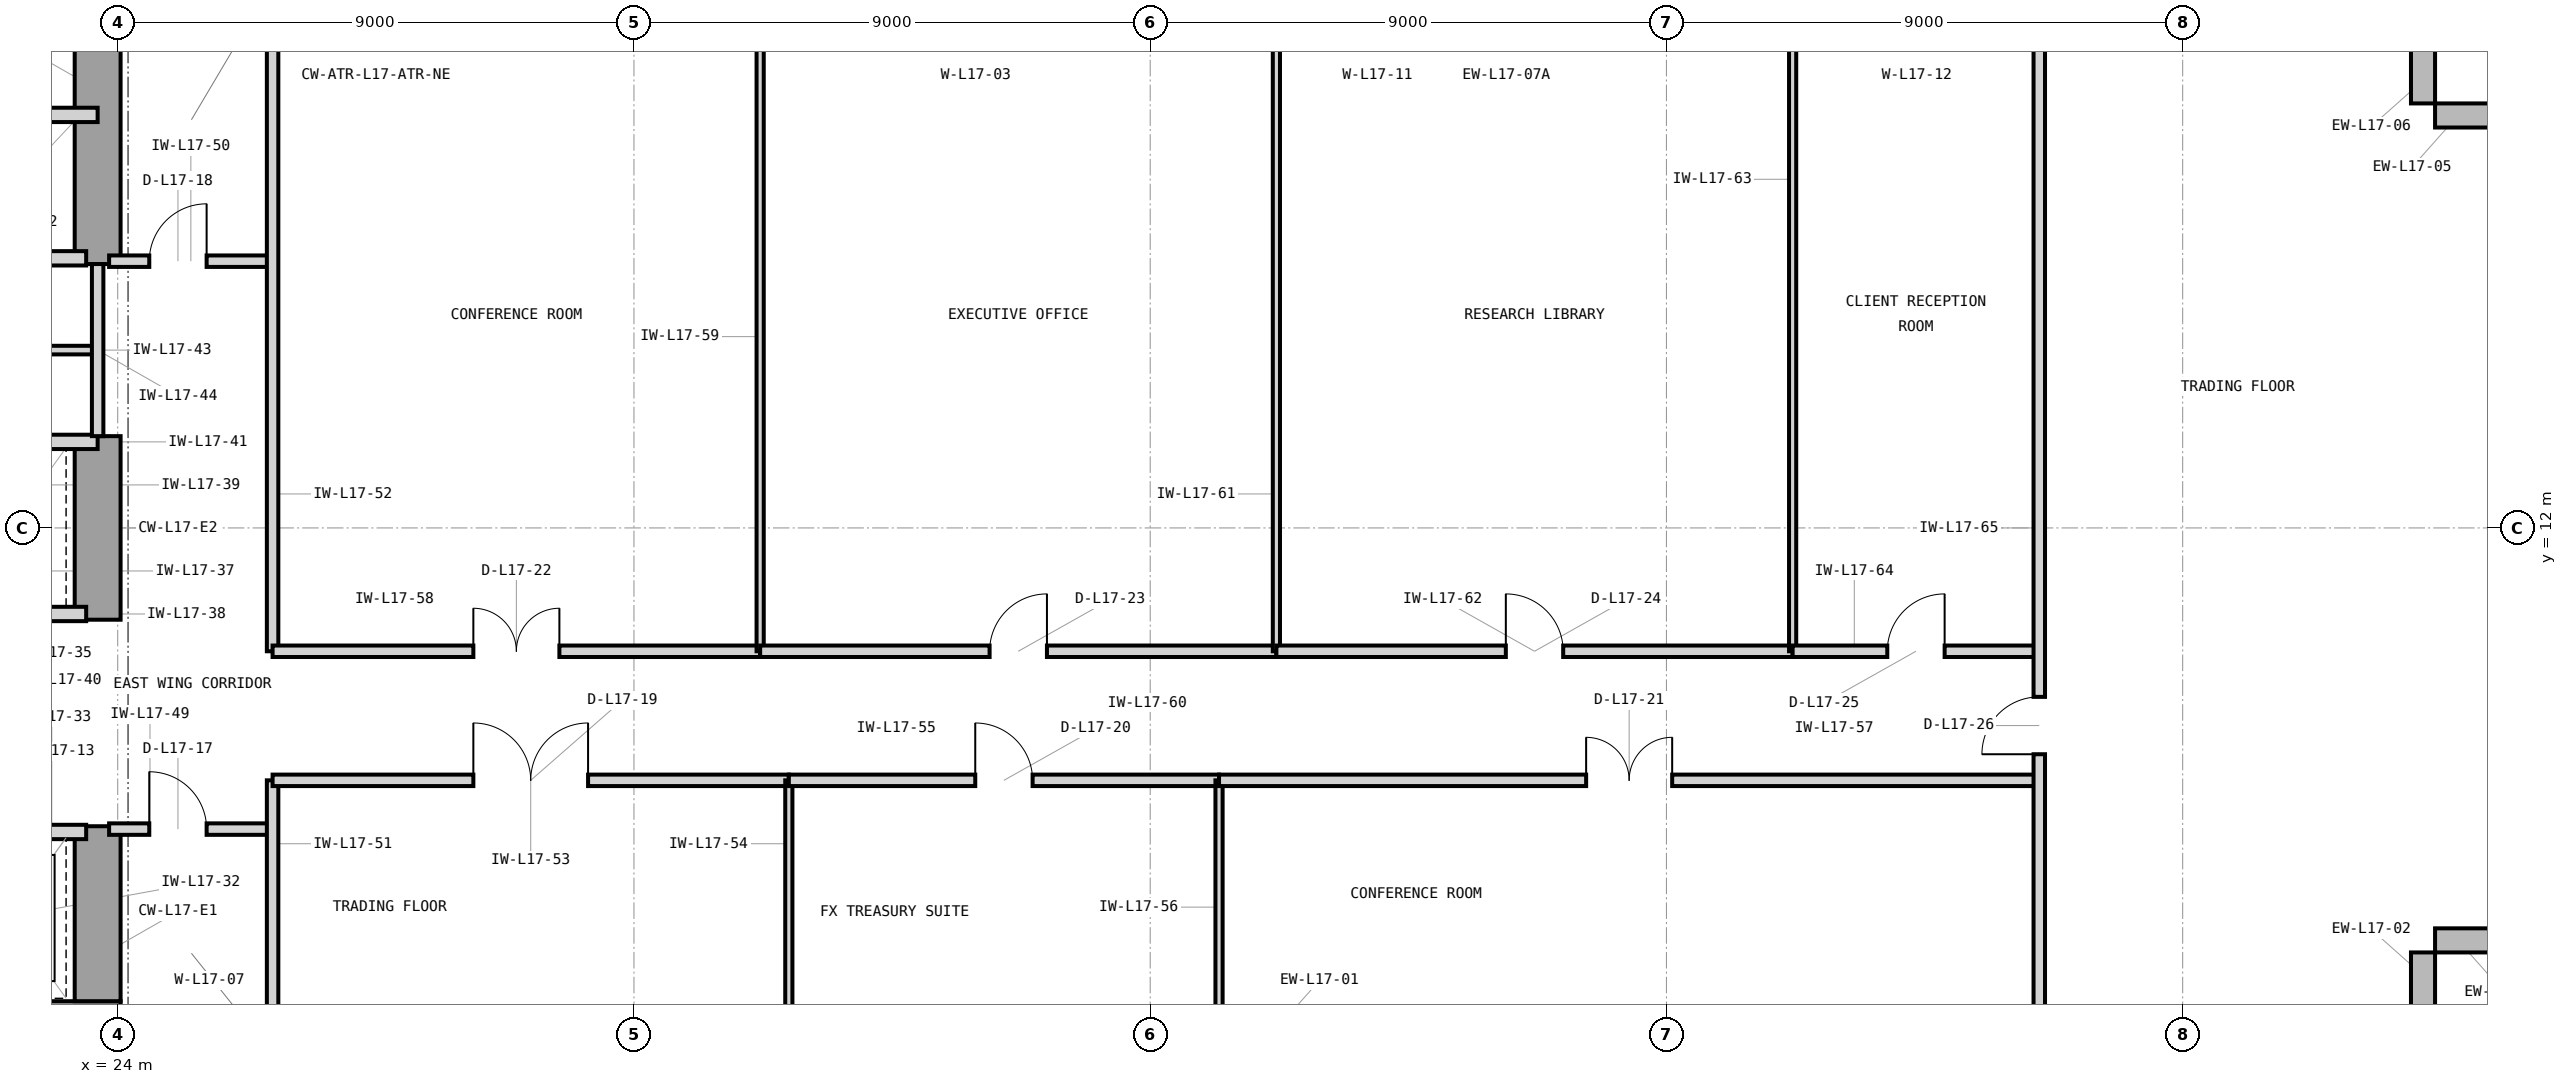
"""IFC4 building model, lengths in metres.
Left out: names, types, materials, properties, quantities, classifications, styles, units other than length and angle.
Written with IfcOpenShell. Run it as: python <this file> out.ifc"""

import sys

from ifc_helpers import new_model, si_unit, direction, frame, frame_2d, origin, place, context, subcontext, project, spatial, rectangle, extrude, element, fill, save


model = new_model("IFC4")
c1 = context("Model", 3, precision=1e-05, world=origin(), true_north=direction((0.0, 1.0)))
c2 = subcontext(c1, "Body", "Model", "MODEL_VIEW")
j1 = project(units=[si_unit("LENGTHUNIT", "METRE"), si_unit("PLANEANGLEUNIT", "RADIAN")], contexts=[c1])
p1 = place(None, origin())
s1 = spatial("IfcSite", under=j1, at=p1, CompositionType="ELEMENT")
p2 = place(p1, origin())
s2 = spatial("IfcBuilding", under=s1, at=p2, CompositionType="ELEMENT")
p3 = place(p2, frame((0.0, 0.0, 76.2)))
s3 = spatial("IfcBuildingStorey", under=s2, at=p3, CompositionType="ELEMENT", Elevation=76.2)
p4 = place(p3, frame((7.475, 3.35, 0.0), z_axis=(0.0, 0.0, 1.0), x_axis=(1.0, 0.0, 0.0)))
e1 = element("IfcWall", 1, at=p4, inside=s3, PredefinedType="SHEAR", context=c2, shape_type="SweptSolid", body=[
    extrude(rectangle(XDim=16.575, YDim=0.8, at=frame_2d((8.288, 0.0))), origin(), (0.0, 0.0, 1.0), 4.2),
])
p5 = place(p3, frame((23.65, 3.75, 0.0), z_axis=(0.0, 0.0, 1.0), x_axis=(0.0, 1.0, 0.0)))
e2 = element("IfcWall", 2, at=p5, inside=s3, PredefinedType="SHEAR", context=c2, shape_type="SweptSolid", body=[
    extrude(rectangle(XDim=3.05, YDim=0.8, at=frame_2d((1.525, 0.0))), origin(), (0.0, 0.0, 1.0), 4.2),
])
p6 = place(p3, frame((23.65, 10.4, 0.0), z_axis=(0.0, 0.0, 1.0), x_axis=(0.0, 1.0, 0.0)))
e3 = element("IfcWall", 3, at=p6, inside=s3, PredefinedType="SHEAR", context=c2, shape_type="SweptSolid", body=[
    extrude(rectangle(XDim=3.2, YDim=0.8, at=frame_2d((1.6, 0.0))), origin(), (0.0, 0.0, 1.0), 4.2),
])
p7 = place(p3, frame((23.65, 16.6, 0.0), z_axis=(0.0, 0.0, 1.0), x_axis=(0.0, 1.0, 0.0)))
e4 = element("IfcWall", 4, at=p7, inside=s3, PredefinedType="SHEAR", context=c2, shape_type="SweptSolid", body=[
    extrude(rectangle(XDim=4.05, YDim=0.8, at=frame_2d((2.025, 0.0))), origin(), (0.0, 0.0, 1.0), 4.2),
])
for number, where, z_axis, x_axis in (
    (5, (64.19, 3.0, 0.0), (0.0, 0.0, 1.0), (0.0, 1.0, 0.0)),
    (6, (64.4, 4.81, 0.0), (0.0, 0.0, 1.0), (1.0, 0.0, 0.0)),
    (7, (66.0, 19.19, 0.0), (0.0, 0.0, 1.0), (-1.0, 0.0, 0.0)),
    (8, (64.19, 19.4, 0.0), (0.0, 0.0, 1.0), (0.0, 1.0, 0.0)),
):
    element("IfcWall", number, at=place(p3, frame(where, z_axis=z_axis, x_axis=x_axis)), inside=s3, PredefinedType="STANDARD", context=c2, shape_type="SweptSolid", body=[
        extrude(rectangle(XDim=1.6, YDim=0.42, at=frame_2d((0.8, 0.0))), origin(), (0.0, 0.0, 1.0), 3.98),
    ])
p8 = place(p3, frame((21.05, 16.7, 0.0), z_axis=(0.0, 0.0, 1.0), x_axis=(1.0, 0.0, 0.0)))
e9 = element("IfcWall", 9, at=p8, inside=s3, PredefinedType="PARTITIONING", context=c2, shape_type="SweptSolid", body=[
    extrude(rectangle(XDim=2.4, YDim=0.25, at=frame_2d((1.2, 0.0))), origin(), (0.0, 0.0, 1.0), 3.426),
])
p9 = place(p3, frame((16.45, 19.2, 0.0), z_axis=(0.0, 0.0, 1.0), x_axis=(1.0, 0.0, 0.0)))
e10 = element("IfcWall", 10, at=p9, inside=s3, PredefinedType="PARTITIONING", context=c2, shape_type="SweptSolid", body=[
    extrude(rectangle(XDim=7.2, YDim=0.25, at=frame_2d((3.6, 0.0))), origin(), (0.0, 0.0, 1.0), 3.97),
])
p10 = place(p3, frame((21.05, 6.7, 0.0), z_axis=(0.0, 0.0, 1.0), x_axis=(1.0, 0.0, 0.0)))
e11 = element("IfcWall", 11, at=p10, inside=s3, PredefinedType="PARTITIONING", context=c2, shape_type="SweptSolid", body=[
    extrude(rectangle(XDim=2.4, YDim=0.25, at=frame_2d((1.2, 0.0))), origin(), (0.0, 0.0, 1.0), 3.426),
])
p11 = place(p10, frame((0.48, 0.0, 0.0)))
e12 = element("IfcOpeningElement", 12, at=p11, cuts=e11, PredefinedType="OPENING", context=c2, shape_type="SweptSolid", body=[
    extrude(rectangle(XDim=1.15, YDim=2.25, at=frame_2d((0.575, 1.125))), frame((0.0, 0.135, 0.0), z_axis=(0.0, -1.0, 0.0), x_axis=(1.0, 0.0, 0.0)), (0.0, 0.0, 1.0), 0.27),
])
p12 = place(p3, frame((21.05, 10.5, 0.0), z_axis=(0.0, 0.0, 1.0), x_axis=(1.0, 0.0, 0.0)))
e13 = element("IfcWall", 13, at=p12, inside=s3, PredefinedType="PARTITIONING", context=c2, shape_type="SweptSolid", body=[
    extrude(rectangle(XDim=2.4, YDim=0.25, at=frame_2d((1.2, 0.0))), origin(), (0.0, 0.0, 1.0), 3.426),
])
p13 = place(p3, frame((14.7, 13.5, 0.0), z_axis=(0.0, 0.0, 1.0), x_axis=(1.0, 0.0, 0.0)))
e14 = element("IfcWall", 14, at=p13, inside=s3, PredefinedType="PARTITIONING", context=c2, shape_type="SweptSolid", body=[
    extrude(rectangle(XDim=8.95, YDim=0.25, at=frame_2d((4.475, 0.0))), origin(), (0.0, 0.0, 1.0), 3.426),
])
p14 = place(p3, frame((18.45, 15.1, 0.0), z_axis=(0.0, 0.0, 1.0), x_axis=(1.0, 0.0, 0.0)))
e15 = element("IfcWall", 15, at=p14, inside=s3, PredefinedType="PARTITIONING", context=c2, shape_type="SweptSolid", body=[
    extrude(rectangle(XDim=5.2, YDim=0.15, at=frame_2d((2.6, 0.0))), origin(), (0.0, 0.0, 1.0), 3.97),
])
p15 = place(p3, frame((23.65, 13.6, 0.0), z_axis=(0.0, 0.0, 1.0), x_axis=(0.0, 1.0, 0.0)))
e16 = element("IfcWall", 16, at=p15, inside=s3, PredefinedType="PARTITIONING", context=c2, shape_type="SweptSolid", body=[
    extrude(rectangle(XDim=3.0, YDim=0.2, at=frame_2d((1.5, 0.0))), origin(), (0.0, 0.0, 1.0), 3.97),
])
p16 = place(p3, frame((23.85, 6.75, 0.0), z_axis=(0.0, 0.0, 1.0), x_axis=(1.0, 0.0, 0.0)))
e17 = element("IfcWall", 17, at=p16, inside=s3, PredefinedType="PARTITIONING", context=c2, shape_type="SweptSolid", body=[
    extrude(rectangle(XDim=2.85, YDim=0.2, at=frame_2d((1.425, 0.0))), origin(), (0.0, 0.0, 1.0), 3.97),
])
p17 = place(p16, frame((0.7, 0.0, 0.0)))
e18 = element("IfcOpeningElement", 18, at=p17, cuts=e17, PredefinedType="OPENING", context=c2, shape_type="SweptSolid", body=[
    extrude(rectangle(XDim=1.0, YDim=2.15, at=frame_2d((0.5, 1.075))), frame((0.0, 0.11, 0.0), z_axis=(0.0, -1.0, 0.0), x_axis=(1.0, 0.0, 0.0)), (0.0, 0.0, 1.0), 0.22),
])
p18 = place(p3, frame((23.85, 16.65, 0.0), z_axis=(0.0, 0.0, 1.0), x_axis=(1.0, 0.0, 0.0)))
e19 = element("IfcWall", 19, at=p18, inside=s3, PredefinedType="PARTITIONING", context=c2, shape_type="SweptSolid", body=[
    extrude(rectangle(XDim=2.85, YDim=0.2, at=frame_2d((1.425, 0.0))), origin(), (0.0, 0.0, 1.0), 3.97),
])
p19 = place(p18, frame((0.7, 0.0, 0.0)))
e20 = element("IfcOpeningElement", 20, at=p19, cuts=e19, PredefinedType="OPENING", context=c2, shape_type="SweptSolid", body=[
    extrude(rectangle(XDim=1.0, YDim=2.15, at=frame_2d((0.5, 1.075))), frame((0.0, 0.11, 0.0), z_axis=(0.0, -1.0, 0.0), x_axis=(1.0, 0.0, 0.0)), (0.0, 0.0, 1.0), 0.22),
])
p20 = place(p3, frame((26.7, 3.18, 0.0), z_axis=(0.0, 0.0, 1.0), x_axis=(0.0, 1.0, 0.0)))
e21 = element("IfcWall", 21, at=p20, inside=s3, PredefinedType="PARTITIONING", context=c2, shape_type="SweptSolid", body=[
    extrude(rectangle(XDim=4.42, YDim=0.2, at=frame_2d((2.21, 0.0))), origin(), (0.0, 0.0, 1.0), 3.97),
])
p21 = place(p3, frame((26.7, 9.85, 0.0), z_axis=(0.0, 0.0, 1.0), x_axis=(0.0, 1.0, 0.0)))
e22 = element("IfcWall", 22, at=p21, inside=s3, PredefinedType="PARTITIONING", context=c2, shape_type="SweptSolid", body=[
    extrude(rectangle(XDim=10.97, YDim=0.2, at=frame_2d((5.485, 0.0))), origin(), (0.0, 0.0, 1.0), 3.97),
])
p22 = place(p3, frame((26.7, 7.6, 0.0), z_axis=(0.0, 0.0, 1.0), x_axis=(1.0, 0.0, 0.0)))
e23 = element("IfcWall", 23, at=p22, inside=s3, PredefinedType="PARTITIONING", context=c2, shape_type="SweptSolid", body=[
    extrude(rectangle(XDim=9.0, YDim=0.2, at=frame_2d((4.5, 0.0))), origin(), (0.0, 0.0, 1.0), 3.97),
])
p23 = place(p22, frame((3.5, 0.0, 0.0)))
e24 = element("IfcOpeningElement", 24, at=p23, cuts=e23, PredefinedType="OPENING", context=c2, shape_type="SweptSolid", body=[
    extrude(rectangle(XDim=2.0, YDim=2.5, at=frame_2d((1.0, 1.25))), frame((0.0, 0.11, 0.0), z_axis=(0.0, -1.0, 0.0), x_axis=(1.0, 0.0, 0.0)), (0.0, 0.0, 1.0), 0.22),
])
p24 = place(p3, frame((35.7, 3.18, 0.0), z_axis=(0.0, 0.0, 1.0), x_axis=(0.0, 1.0, 0.0)))
e25 = element("IfcWall", 25, at=p24, inside=s3, PredefinedType="PARTITIONING", context=c2, shape_type="SweptSolid", body=[
    extrude(rectangle(XDim=4.42, YDim=0.125, at=frame_2d((2.21, 0.0))), origin(), (0.0, 0.0, 1.0), 3.97),
])
p25 = place(p3, frame((35.7, 7.6, 0.0), z_axis=(0.0, 0.0, 1.0), x_axis=(1.0, 0.0, 0.0)))
e26 = element("IfcWall", 26, at=p25, inside=s3, PredefinedType="PARTITIONING", context=c2, shape_type="SweptSolid", body=[
    extrude(rectangle(XDim=7.5, YDim=0.2, at=frame_2d((3.75, 0.0))), origin(), (0.0, 0.0, 1.0), 3.97),
])
p26 = place(p25, frame((3.25, 0.0, 0.0)))
e27 = element("IfcOpeningElement", 27, at=p26, cuts=e26, PredefinedType="OPENING", context=c2, shape_type="SweptSolid", body=[
    extrude(rectangle(XDim=1.0, YDim=2.15, at=frame_2d((0.5, 1.075))), frame((0.0, 0.11, 0.0), z_axis=(0.0, -1.0, 0.0), x_axis=(1.0, 0.0, 0.0)), (0.0, 0.0, 1.0), 0.22),
])
p27 = place(p3, frame((43.2, 3.18, 0.0), z_axis=(0.0, 0.0, 1.0), x_axis=(0.0, 1.0, 0.0)))
e28 = element("IfcWall", 28, at=p27, inside=s3, PredefinedType="PARTITIONING", context=c2, shape_type="SweptSolid", body=[
    extrude(rectangle(XDim=4.42, YDim=0.125, at=frame_2d((2.21, 0.0))), origin(), (0.0, 0.0, 1.0), 3.97),
])
p28 = place(p3, frame((43.2, 7.6, 0.0), z_axis=(0.0, 0.0, 1.0), x_axis=(1.0, 0.0, 0.0)))
e29 = element("IfcWall", 29, at=p28, inside=s3, PredefinedType="PARTITIONING", context=c2, shape_type="SweptSolid", body=[
    extrude(rectangle(XDim=14.3, YDim=0.2, at=frame_2d((7.15, 0.0))), origin(), (0.0, 0.0, 1.0), 3.97),
])
p29 = place(p28, frame((6.4, 0.0, 0.0)))
e30 = element("IfcOpeningElement", 30, at=p29, cuts=e29, PredefinedType="OPENING", context=c2, shape_type="SweptSolid", body=[
    extrude(rectangle(XDim=1.5, YDim=2.3, at=frame_2d((0.75, 1.15))), frame((0.0, 0.11, 0.0), z_axis=(0.0, -1.0, 0.0), x_axis=(1.0, 0.0, 0.0)), (0.0, 0.0, 1.0), 0.22),
])
p30 = place(p3, frame((26.7, 9.85, 0.0), z_axis=(0.0, 0.0, 1.0), x_axis=(1.0, 0.0, 0.0)))
e31 = element("IfcWall", 31, at=p30, inside=s3, PredefinedType="PARTITIONING", context=c2, shape_type="SweptSolid", body=[
    extrude(rectangle(XDim=8.5, YDim=0.2, at=frame_2d((4.25, 0.0))), origin(), (0.0, 0.0, 1.0), 3.97),
])
p31 = place(p30, frame((3.5, 0.0, 0.0)))
e32 = element("IfcOpeningElement", 32, at=p31, cuts=e31, PredefinedType="OPENING", context=c2, shape_type="SweptSolid", body=[
    extrude(rectangle(XDim=1.5, YDim=2.3, at=frame_2d((0.75, 1.15))), frame((0.0, 0.11, 0.0), z_axis=(0.0, -1.0, 0.0), x_axis=(1.0, 0.0, 0.0)), (0.0, 0.0, 1.0), 0.22),
])
p32 = place(p3, frame((35.2, 9.85, 0.0), z_axis=(0.0, 0.0, 1.0), x_axis=(0.0, 1.0, 0.0)))
e33 = element("IfcWall", 33, at=p32, inside=s3, PredefinedType="PARTITIONING", context=c2, shape_type="SweptSolid", body=[
    extrude(rectangle(XDim=10.97, YDim=0.125, at=frame_2d((5.485, 0.0))), origin(), (0.0, 0.0, 1.0), 3.97),
])
p33 = place(p3, frame((35.2, 9.85, 0.0), z_axis=(0.0, 0.0, 1.0), x_axis=(1.0, 0.0, 0.0)))
e34 = element("IfcWall", 34, at=p33, inside=s3, PredefinedType="PARTITIONING", context=c2, shape_type="SweptSolid", body=[
    extrude(rectangle(XDim=9.0, YDim=0.2, at=frame_2d((4.5, 0.0))), origin(), (0.0, 0.0, 1.0), 3.97),
])
p34 = place(p33, frame((4.0, 0.0, 0.0)))
e35 = element("IfcOpeningElement", 35, at=p34, cuts=e34, PredefinedType="OPENING", context=c2, shape_type="SweptSolid", body=[
    extrude(rectangle(XDim=1.0, YDim=2.15, at=frame_2d((0.5, 1.075))), frame((0.0, 0.11, 0.0), z_axis=(0.0, -1.0, 0.0), x_axis=(1.0, 0.0, 0.0)), (0.0, 0.0, 1.0), 0.22),
])
p35 = place(p3, frame((44.2, 9.85, 0.0), z_axis=(0.0, 0.0, 1.0), x_axis=(0.0, 1.0, 0.0)))
e36 = element("IfcWall", 36, at=p35, inside=s3, PredefinedType="PARTITIONING", context=c2, shape_type="SweptSolid", body=[
    extrude(rectangle(XDim=10.97, YDim=0.125, at=frame_2d((5.485, 0.0))), origin(), (0.0, 0.0, 1.0), 3.97),
])
p36 = place(p3, frame((44.2, 9.85, 0.0), z_axis=(0.0, 0.0, 1.0), x_axis=(1.0, 0.0, 0.0)))
e37 = element("IfcWall", 37, at=p36, inside=s3, PredefinedType="PARTITIONING", context=c2, shape_type="SweptSolid", body=[
    extrude(rectangle(XDim=9.0, YDim=0.2, at=frame_2d((4.5, 0.0))), origin(), (0.0, 0.0, 1.0), 3.97),
])
p37 = place(p36, frame((4.0, 0.0, 0.0)))
e38 = element("IfcOpeningElement", 38, at=p37, cuts=e37, PredefinedType="OPENING", context=c2, shape_type="SweptSolid", body=[
    extrude(rectangle(XDim=1.0, YDim=2.15, at=frame_2d((0.5, 1.075))), frame((0.0, 0.11, 0.0), z_axis=(0.0, -1.0, 0.0), x_axis=(1.0, 0.0, 0.0)), (0.0, 0.0, 1.0), 0.22),
])
p38 = place(p3, frame((53.2, 9.85, 0.0), z_axis=(0.0, 0.0, 1.0), x_axis=(0.0, 1.0, 0.0)))
e39 = element("IfcWall", 39, at=p38, inside=s3, PredefinedType="PARTITIONING", context=c2, shape_type="SweptSolid", body=[
    extrude(rectangle(XDim=10.97, YDim=0.125, at=frame_2d((5.485, 0.0))), origin(), (0.0, 0.0, 1.0), 3.97),
])
p39 = place(p3, frame((53.2, 9.85, 0.0), z_axis=(0.0, 0.0, 1.0), x_axis=(1.0, 0.0, 0.0)))
e40 = element("IfcWall", 40, at=p39, inside=s3, PredefinedType="PARTITIONING", context=c2, shape_type="SweptSolid", body=[
    extrude(rectangle(XDim=4.3, YDim=0.2, at=frame_2d((2.15, 0.0))), origin(), (0.0, 0.0, 1.0), 3.97),
])
p40 = place(p39, frame((1.65, 0.0, 0.0)))
e41 = element("IfcOpeningElement", 41, at=p40, cuts=e40, PredefinedType="OPENING", context=c2, shape_type="SweptSolid", body=[
    extrude(rectangle(XDim=1.0, YDim=2.15, at=frame_2d((0.5, 1.075))), frame((0.0, 0.11, 0.0), z_axis=(0.0, -1.0, 0.0), x_axis=(1.0, 0.0, 0.0)), (0.0, 0.0, 1.0), 0.22),
])
p41 = place(p3, frame((57.5, 3.18, 0.0), z_axis=(0.0, 0.0, 1.0), x_axis=(0.0, 1.0, 0.0)))
e42 = element("IfcWall", 42, at=p41, inside=s3, PredefinedType="PARTITIONING", context=c2, shape_type="SweptSolid", body=[
    extrude(rectangle(XDim=17.64, YDim=0.2, at=frame_2d((8.82, 0.0))), origin(), (0.0, 0.0, 1.0), 3.97),
])
p42 = place(p41, frame((4.875, 0.0, 0.0)))
e43 = element("IfcOpeningElement", 43, at=p42, cuts=e42, PredefinedType="OPENING", context=c2, shape_type="SweptSolid", body=[
    extrude(rectangle(XDim=1.0, YDim=2.15, at=frame_2d((0.5, 1.075))), frame((0.0, 0.11, 0.0), z_axis=(0.0, -1.0, 0.0), x_axis=(1.0, 0.0, 0.0)), (0.0, 0.0, 1.0), 0.22),
])
p43 = place(p17, origin())
e44 = element("IfcDoor", 44, at=p43, inside=s3, OperationType="SINGLE_SWING_LEFT", PredefinedType="DOOR", context=c2, shape_type="SweptSolid", body=[
    extrude(rectangle(XDim=1.0, YDim=2.15, at=frame_2d((0.5, 1.075))), frame((0.0, 0.025, 0.0), z_axis=(0.0, -1.0, 0.0), x_axis=(1.0, 0.0, 0.0)), (0.0, 0.0, 1.0), 0.05),
])
fill(e18, e44)
p44 = place(p19, origin())
e45 = element("IfcDoor", 45, at=p44, inside=s3, OperationType="SINGLE_SWING_RIGHT", PredefinedType="DOOR", context=c2, shape_type="SweptSolid", body=[
    extrude(rectangle(XDim=1.0, YDim=2.15, at=frame_2d((0.5, 1.075))), frame((0.0, 0.025, 0.0), z_axis=(0.0, -1.0, 0.0), x_axis=(1.0, 0.0, 0.0)), (0.0, 0.0, 1.0), 0.05),
])
fill(e20, e45)
p45 = place(p23, origin())
e46 = element("IfcDoor", 46, at=p45, inside=s3, OperationType="DOUBLE_DOOR_SINGLE_SWING", PredefinedType="DOOR", context=c2, shape_type="SweptSolid", body=[
    extrude(rectangle(XDim=2.0, YDim=2.5, at=frame_2d((1.0, 1.25))), frame((0.0, 0.025, 0.0), z_axis=(0.0, -1.0, 0.0), x_axis=(1.0, 0.0, 0.0)), (0.0, 0.0, 1.0), 0.05),
])
fill(e24, e46)
p46 = place(p26, origin())
e47 = element("IfcDoor", 47, at=p46, inside=s3, OperationType="SINGLE_SWING_LEFT", PredefinedType="DOOR", context=c2, shape_type="SweptSolid", body=[
    extrude(rectangle(XDim=1.0, YDim=2.15, at=frame_2d((0.5, 1.075))), frame((0.0, 0.025, 0.0), z_axis=(0.0, -1.0, 0.0), x_axis=(1.0, 0.0, 0.0)), (0.0, 0.0, 1.0), 0.05),
])
fill(e27, e47)
p47 = place(p29, origin())
e48 = element("IfcDoor", 48, at=p47, inside=s3, OperationType="DOUBLE_DOOR_SINGLE_SWING", PredefinedType="DOOR", context=c2, shape_type="SweptSolid", body=[
    extrude(rectangle(XDim=1.5, YDim=2.3, at=frame_2d((0.75, 1.15))), frame((0.0, 0.025, 0.0), z_axis=(0.0, -1.0, 0.0), x_axis=(1.0, 0.0, 0.0)), (0.0, 0.0, 1.0), 0.05),
])
fill(e30, e48)
p48 = place(p31, origin())
e49 = element("IfcDoor", 49, at=p48, inside=s3, OperationType="DOUBLE_DOOR_SINGLE_SWING", PredefinedType="DOOR", context=c2, shape_type="SweptSolid", body=[
    extrude(rectangle(XDim=1.5, YDim=2.3, at=frame_2d((0.75, 1.15))), frame((0.0, 0.025, 0.0), z_axis=(0.0, -1.0, 0.0), x_axis=(1.0, 0.0, 0.0)), (0.0, 0.0, 1.0), 0.05),
])
fill(e32, e49)
p49 = place(p34, origin())
e50 = element("IfcDoor", 50, at=p49, inside=s3, OperationType="SINGLE_SWING_RIGHT", PredefinedType="DOOR", context=c2, shape_type="SweptSolid", body=[
    extrude(rectangle(XDim=1.0, YDim=2.15, at=frame_2d((0.5, 1.075))), frame((0.0, 0.025, 0.0), z_axis=(0.0, -1.0, 0.0), x_axis=(1.0, 0.0, 0.0)), (0.0, 0.0, 1.0), 0.05),
])
fill(e35, e50)
p50 = place(p37, origin())
e51 = element("IfcDoor", 51, at=p50, inside=s3, OperationType="SINGLE_SWING_LEFT", PredefinedType="DOOR", context=c2, shape_type="SweptSolid", body=[
    extrude(rectangle(XDim=1.0, YDim=2.15, at=frame_2d((0.5, 1.075))), frame((0.0, 0.025, 0.0), z_axis=(0.0, -1.0, 0.0), x_axis=(1.0, 0.0, 0.0)), (0.0, 0.0, 1.0), 0.05),
])
fill(e38, e51)
p51 = place(p40, origin())
e52 = element("IfcDoor", 52, at=p51, inside=s3, OperationType="SINGLE_SWING_RIGHT", PredefinedType="DOOR", context=c2, shape_type="SweptSolid", body=[
    extrude(rectangle(XDim=1.0, YDim=2.15, at=frame_2d((0.5, 1.075))), frame((0.0, 0.025, 0.0), z_axis=(0.0, -1.0, 0.0), x_axis=(1.0, 0.0, 0.0)), (0.0, 0.0, 1.0), 0.05),
])
fill(e41, e52)
p52 = place(p42, origin())
e53 = element("IfcDoor", 53, at=p52, inside=s3, OperationType="SINGLE_SWING_LEFT", PredefinedType="DOOR", context=c2, shape_type="SweptSolid", body=[
    extrude(rectangle(XDim=1.0, YDim=2.15, at=frame_2d((0.5, 1.075))), frame((0.0, 0.025, 0.0), z_axis=(0.0, -1.0, 0.0), x_axis=(1.0, 0.0, 0.0)), (0.0, 0.0, 1.0), 0.05),
])
fill(e43, e53)
save(model, sys.argv[1])
